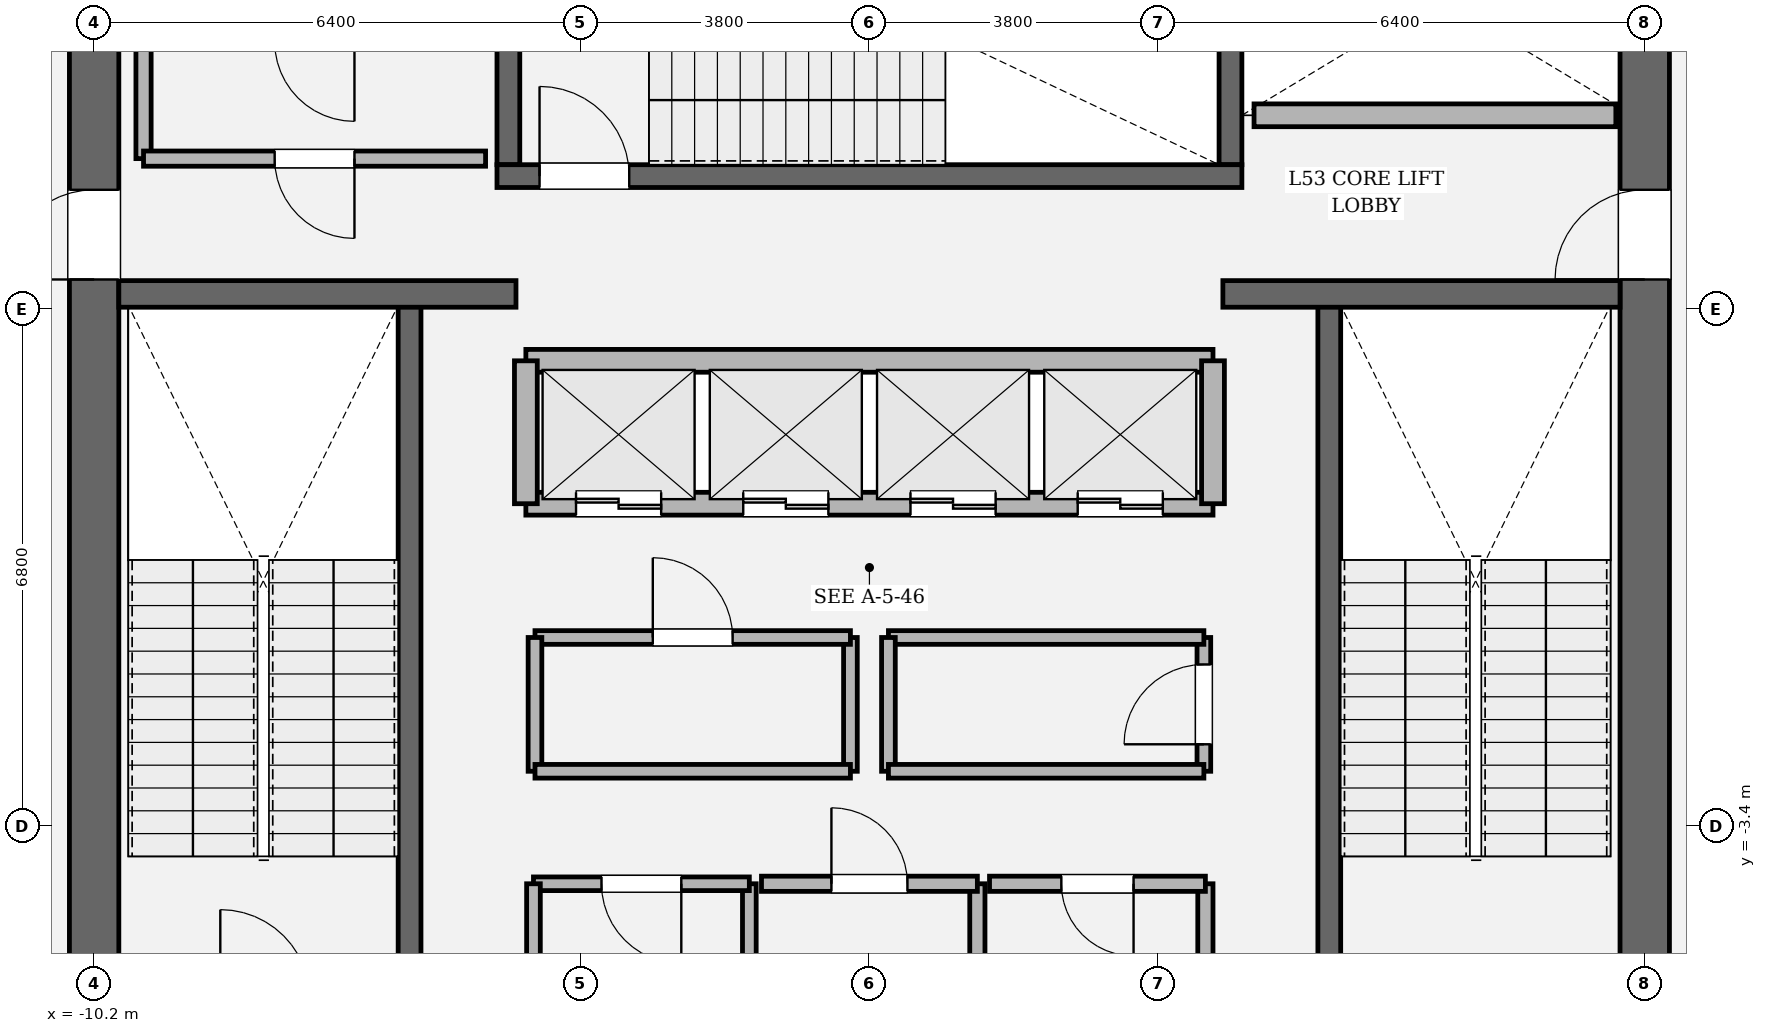
"""IFC4 building model, lengths in metres.
Left out: names, types, materials, properties, quantities, classifications, styles, units other than length and angle.
Written with IfcOpenShell. Run it as: python <this file> out.ifc"""

import sys

from ifc_helpers import new_model, si_unit, direction, frame, frame_2d, origin, place, context, subcontext, project, spatial, rectangle, extrude, element, fill, save


model = new_model("IFC4")
c1 = context("Model", 3, precision=1e-05, world=origin(), true_north=direction((0.0, 1.0)))
c2 = subcontext(c1, "Body", "Model", "MODEL_VIEW")
j1 = project(units=[si_unit("LENGTHUNIT", "METRE"), si_unit("PLANEANGLEUNIT", "RADIAN")], contexts=[c1])
p1 = place(None, origin())
s1 = spatial("IfcSite", under=j1, at=p1, CompositionType="ELEMENT")
p2 = place(p1, origin())
s2 = spatial("IfcBuilding", under=s1, at=p2, CompositionType="ELEMENT")
p3 = place(p2, frame((0.0, 0.0, 224.85)))
s3 = spatial("IfcBuildingStorey", under=s2, at=p3, CompositionType="ELEMENT", Elevation=224.85)
p4 = place(p3, frame((-10.2, -8.875, 0.0), z_axis=(0.0, 0.0, 1.0), x_axis=(0.0, 1.0, 0.0)))
e1 = element("IfcWall", 1, at=p4, inside=s3, PredefinedType="SHEAR", context=c2, shape_type="SweptSolid", body=[
    extrude(rectangle(XDim=17.75, YDim=0.65, at=frame_2d((8.875, 0.0))), origin(), (0.0, 0.0, 1.0), 4.05),
])
p5 = place(p4, frame((12.665, 0.0, 0.0)))
e2 = element("IfcOpeningElement", 2, at=p5, cuts=e1, PredefinedType="OPENING", context=c2, shape_type="SweptSolid", body=[
    extrude(rectangle(XDim=1.18, YDim=2.2, at=frame_2d((0.59, 1.1))), frame((0.0, 0.335, 0.0), z_axis=(0.0, -1.0, 0.0), x_axis=(1.0, 0.0, 0.0)), (0.0, 0.0, 1.0), 0.67),
])
p6 = place(p3, frame((10.2, 8.875, 0.0), z_axis=(0.0, 0.0, 1.0), x_axis=(0.0, -1.0, 0.0)))
e3 = element("IfcWall", 3, at=p6, inside=s3, PredefinedType="SHEAR", context=c2, shape_type="SweptSolid", body=[
    extrude(rectangle(XDim=17.75, YDim=0.65, at=frame_2d((8.875, 0.0))), origin(), (0.0, 0.0, 1.0), 4.05),
])
p7 = place(p6, frame((3.905, 0.0, 0.0)))
e4 = element("IfcOpeningElement", 4, at=p7, cuts=e3, PredefinedType="OPENING", context=c2, shape_type="SweptSolid", body=[
    extrude(rectangle(XDim=1.18, YDim=2.2, at=frame_2d((0.59, 1.1))), frame((0.0, 0.335, 0.0), z_axis=(0.0, -1.0, 0.0), x_axis=(1.0, 0.0, 0.0)), (0.0, 0.0, 1.0), 0.67),
])
for number, where, z_axis, x_axis in (
    (5, (-6.05, -5.5, 0.0), (0.0, 0.0, 1.0), (0.0, 1.0, 0.0)),
    (6, (6.05, 3.45, 0.0), (0.0, 0.0, 1.0), (0.0, -1.0, 0.0)),
):
    element("IfcWall", number, at=place(p3, frame(where, z_axis=z_axis, x_axis=x_axis)), inside=s3, PredefinedType="SOLIDWALL", context=c2, shape_type="SweptSolid", body=[
        extrude(rectangle(XDim=8.95, YDim=0.3, at=frame_2d((4.475, 0.0))), origin(), (0.0, 0.0, 1.0), 4.05),
    ])
for number, where, z_axis, x_axis in (
    (7, (-4.75, 5.3, 0.0), (0.0, 0.0, 1.0), (0.0, 1.0, 0.0)),
    (8, (4.75, 8.875, 0.0), (0.0, 0.0, 1.0), (0.0, -1.0, 0.0)),
):
    element("IfcWall", number, at=place(p3, frame(where, z_axis=z_axis, x_axis=x_axis)), inside=s3, PredefinedType="SOLIDWALL", context=c2, shape_type="SweptSolid", body=[
        extrude(rectangle(XDim=3.575, YDim=0.3, at=frame_2d((1.788, 0.0))), origin(), (0.0, 0.0, 1.0), 4.05),
    ])
p8 = place(p3, frame((-4.9, 5.15, 0.0), z_axis=(0.0, 0.0, 1.0), x_axis=(1.0, 0.0, 0.0)))
e9 = element("IfcWall", 9, at=p8, inside=s3, PredefinedType="SOLIDWALL", context=c2, shape_type="SweptSolid", body=[
    extrude(rectangle(XDim=9.8, YDim=0.3, at=frame_2d((4.9, 0.0))), origin(), (0.0, 0.0, 1.0), 4.05),
])
p9 = place(p8, frame((0.56, 0.0, 0.0)))
e10 = element("IfcOpeningElement", 10, at=p9, cuts=e9, PredefinedType="OPENING", context=c2, shape_type="SweptSolid", body=[
    extrude(rectangle(XDim=1.18, YDim=2.2, at=frame_2d((0.59, 1.1))), frame((0.0, 0.16, 0.0), z_axis=(0.0, -1.0, 0.0), x_axis=(1.0, 0.0, 0.0)), (0.0, 0.0, 1.0), 0.32),
])
for number, where, z_axis, x_axis in (
    (11, (-9.875, 3.6, 0.0), (0.0, 0.0, 1.0), (1.0, 0.0, 0.0)),
    (12, (4.65, 3.6, 0.0), (0.0, 0.0, 1.0), (1.0, 0.0, 0.0)),
):
    element("IfcWall", number, at=place(p3, frame(where, z_axis=z_axis, x_axis=x_axis)), inside=s3, PredefinedType="SOLIDWALL", context=c2, shape_type="SweptSolid", body=[
        extrude(rectangle(XDim=5.225, YDim=0.35, at=frame_2d((2.613, 0.0))), origin(), (0.0, 0.0, 1.0), 4.05),
    ])
p10 = place(p3, frame((-4.52, 0.84, 0.0), z_axis=(0.0, 0.0, 1.0), x_axis=(1.0, 0.0, 0.0)))
e13 = element("IfcWall", 13, at=p10, inside=s3, PredefinedType="SOLIDWALL", context=c2, shape_type="SweptSolid", body=[
    extrude(rectangle(XDim=9.04, YDim=0.3, at=frame_2d((4.52, 0.0))), origin(), (0.0, 0.0, 1.0), 3.83),
])
p11 = place(p10, frame((0.66, 0.0, 0.0)))
e14 = element("IfcOpeningElement", 14, at=p11, cuts=e13, PredefinedType="OPENING", context=c2, shape_type="SweptSolid", body=[
    extrude(rectangle(XDim=1.12, YDim=2.25, at=frame_2d((0.56, 1.125))), frame((0.0, 0.16, 0.0), z_axis=(0.0, -1.0, 0.0), x_axis=(1.0, 0.0, 0.0)), (0.0, 0.0, 1.0), 0.32),
])
p12 = place(p10, frame((2.86, 0.0, 0.0)))
e15 = element("IfcOpeningElement", 15, at=p12, cuts=e13, PredefinedType="OPENING", context=c2, shape_type="SweptSolid", body=[
    extrude(rectangle(XDim=1.12, YDim=2.25, at=frame_2d((0.56, 1.125))), frame((0.0, 0.16, 0.0), z_axis=(0.0, -1.0, 0.0), x_axis=(1.0, 0.0, 0.0)), (0.0, 0.0, 1.0), 0.32),
])
p13 = place(p10, frame((5.06, 0.0, 0.0)))
e16 = element("IfcOpeningElement", 16, at=p13, cuts=e13, PredefinedType="OPENING", context=c2, shape_type="SweptSolid", body=[
    extrude(rectangle(XDim=1.12, YDim=2.25, at=frame_2d((0.56, 1.125))), frame((0.0, 0.16, 0.0), z_axis=(0.0, -1.0, 0.0), x_axis=(1.0, 0.0, 0.0)), (0.0, 0.0, 1.0), 0.32),
])
p14 = place(p10, frame((7.26, 0.0, 0.0)))
e17 = element("IfcOpeningElement", 17, at=p14, cuts=e13, PredefinedType="OPENING", context=c2, shape_type="SweptSolid", body=[
    extrude(rectangle(XDim=1.12, YDim=2.25, at=frame_2d((0.56, 1.125))), frame((0.0, 0.16, 0.0), z_axis=(0.0, -1.0, 0.0), x_axis=(1.0, 0.0, 0.0)), (0.0, 0.0, 1.0), 0.32),
])
p15 = place(p3, frame((-4.52, 2.72, 0.0), z_axis=(0.0, 0.0, 1.0), x_axis=(1.0, 0.0, 0.0)))
e18 = element("IfcWall", 18, at=p15, inside=s3, PredefinedType="SOLIDWALL", context=c2, shape_type="SweptSolid", body=[
    extrude(rectangle(XDim=9.04, YDim=0.3, at=frame_2d((4.52, 0.0))), origin(), (0.0, 0.0, 1.0), 3.83),
])
for number, where, z_axis, x_axis in (
    (19, (-4.52, 0.84, 0.0), (0.0, 0.0, 1.0), (0.0, 1.0, 0.0)),
    (20, (4.52, 0.84, 0.0), (0.0, 0.0, 1.0), (0.0, 1.0, 0.0)),
):
    element("IfcWall", number, at=place(p3, frame(where, z_axis=z_axis, x_axis=x_axis)), inside=s3, PredefinedType="SOLIDWALL", context=c2, shape_type="SweptSolid", body=[
        extrude(rectangle(XDim=1.88, YDim=0.3, at=frame_2d((0.94, 0.0))), origin(), (0.0, 0.0, 1.0), 3.83),
    ])
p16 = place(p3, frame((5.06, 5.95, 0.0), z_axis=(0.0, 0.0, 1.0), x_axis=(1.0, 0.0, 0.0)))
e21 = element("IfcWall", 21, at=p16, inside=s3, PredefinedType="SOLIDWALL", context=c2, shape_type="SweptSolid", body=[
    extrude(rectangle(XDim=4.76, YDim=0.3, at=frame_2d((2.38, 0.0))), origin(), (0.0, 0.0, 1.0), 3.83),
])
p17 = place(p3, frame((-1.58, -5.9, 0.0), z_axis=(0.0, 0.0, 1.0), x_axis=(0.0, 1.0, 0.0)))
e22 = element("IfcWall", 22, at=p17, inside=s3, PredefinedType="PARTITIONING", context=c2, shape_type="SweptSolid", body=[
    extrude(rectangle(XDim=1.74, YDim=0.18, at=frame_2d((0.87, 0.0))), origin(), (0.0, 0.0, 1.0), 3.83),
])
p18 = place(p3, frame((-1.58, -4.16, 0.0), z_axis=(0.0, 0.0, 1.0), x_axis=(-1.0, 0.0, 0.0)))
e23 = element("IfcWall", 23, at=p18, inside=s3, PredefinedType="PARTITIONING", context=c2, shape_type="SweptSolid", body=[
    extrude(rectangle(XDim=2.84, YDim=0.18, at=frame_2d((1.42, 0.0))), origin(), (0.0, 0.0, 1.0), 3.83),
])
p19 = place(p18, frame((0.895, 0.0, 0.0)))
e24 = element("IfcOpeningElement", 24, at=p19, cuts=e23, PredefinedType="OPENING", context=c2, shape_type="SweptSolid", body=[
    extrude(rectangle(XDim=1.05, YDim=2.2, at=frame_2d((0.525, 1.1))), frame((0.0, 0.1, 0.0), z_axis=(0.0, -1.0, 0.0), x_axis=(1.0, 0.0, 0.0)), (0.0, 0.0, 1.0), 0.2),
])
p20 = place(p3, frame((-4.42, -4.16, 0.0), z_axis=(0.0, 0.0, 1.0), x_axis=(0.0, -1.0, 0.0)))
e25 = element("IfcWall", 25, at=p20, inside=s3, PredefinedType="PARTITIONING", context=c2, shape_type="SweptSolid", body=[
    extrude(rectangle(XDim=1.74, YDim=0.18, at=frame_2d((0.87, 0.0))), origin(), (0.0, 0.0, 1.0), 3.83),
])
p21 = place(p3, frame((1.42, -5.9, 0.0), z_axis=(0.0, 0.0, 1.0), x_axis=(0.0, 1.0, 0.0)))
e26 = element("IfcWall", 26, at=p21, inside=s3, PredefinedType="SOLIDWALL", context=c2, shape_type="SweptSolid", body=[
    extrude(rectangle(XDim=1.74, YDim=0.2, at=frame_2d((0.87, 0.0))), origin(), (0.0, 0.0, 1.0), 3.83),
])
p22 = place(p3, frame((1.42, -4.16, 0.0), z_axis=(0.0, 0.0, 1.0), x_axis=(-1.0, 0.0, 0.0)))
e27 = element("IfcWall", 27, at=p22, inside=s3, PredefinedType="SOLIDWALL", context=c2, shape_type="SweptSolid", body=[
    extrude(rectangle(XDim=2.84, YDim=0.2, at=frame_2d((1.42, 0.0))), origin(), (0.0, 0.0, 1.0), 3.83),
])
p23 = place(p22, frame((0.92, 0.0, 0.0)))
e28 = element("IfcOpeningElement", 28, at=p23, cuts=e27, PredefinedType="OPENING", context=c2, shape_type="SweptSolid", body=[
    extrude(rectangle(XDim=1.0, YDim=2.15, at=frame_2d((0.5, 1.075))), frame((0.0, 0.11, 0.0), z_axis=(0.0, -1.0, 0.0), x_axis=(1.0, 0.0, 0.0)), (0.0, 0.0, 1.0), 0.22),
])
p24 = place(p3, frame((4.42, -5.9, 0.0), z_axis=(0.0, 0.0, 1.0), x_axis=(0.0, 1.0, 0.0)))
e29 = element("IfcWall", 29, at=p24, inside=s3, PredefinedType="SOLIDWALL", context=c2, shape_type="SweptSolid", body=[
    extrude(rectangle(XDim=1.74, YDim=0.2, at=frame_2d((0.87, 0.0))), origin(), (0.0, 0.0, 1.0), 3.83),
])
p25 = place(p3, frame((4.42, -4.16, 0.0), z_axis=(0.0, 0.0, 1.0), x_axis=(-1.0, 0.0, 0.0)))
e30 = element("IfcWall", 30, at=p25, inside=s3, PredefinedType="SOLIDWALL", context=c2, shape_type="SweptSolid", body=[
    extrude(rectangle(XDim=2.84, YDim=0.2, at=frame_2d((1.42, 0.0))), origin(), (0.0, 0.0, 1.0), 3.83),
])
p26 = place(p25, frame((0.945, 0.0, 0.0)))
e31 = element("IfcOpeningElement", 31, at=p26, cuts=e30, PredefinedType="OPENING", context=c2, shape_type="SweptSolid", body=[
    extrude(rectangle(XDim=0.95, YDim=2.15, at=frame_2d((0.475, 1.075))), frame((0.0, 0.11, 0.0), z_axis=(0.0, -1.0, 0.0), x_axis=(1.0, 0.0, 0.0)), (0.0, 0.0, 1.0), 0.22),
])
p27 = place(p3, frame((-0.25, -2.68, 0.0), z_axis=(0.0, 0.0, 1.0), x_axis=(0.0, 1.0, 0.0)))
e32 = element("IfcWall", 32, at=p27, inside=s3, PredefinedType="PARTITIONING", context=c2, shape_type="SweptSolid", body=[
    extrude(rectangle(XDim=1.76, YDim=0.18, at=frame_2d((0.88, 0.0))), origin(), (0.0, 0.0, 1.0), 3.83),
])
p28 = place(p3, frame((-0.25, -0.92, 0.0), z_axis=(0.0, 0.0, 1.0), x_axis=(-1.0, 0.0, 0.0)))
e33 = element("IfcWall", 33, at=p28, inside=s3, PredefinedType="PARTITIONING", context=c2, shape_type="SweptSolid", body=[
    extrude(rectangle(XDim=4.15, YDim=0.18, at=frame_2d((2.075, 0.0))), origin(), (0.0, 0.0, 1.0), 3.83),
])
p29 = place(p28, frame((1.55, 0.0, 0.0)))
e34 = element("IfcOpeningElement", 34, at=p29, cuts=e33, PredefinedType="OPENING", context=c2, shape_type="SweptSolid", body=[
    extrude(rectangle(XDim=1.05, YDim=2.2, at=frame_2d((0.525, 1.1))), frame((0.0, 0.1, 0.0), z_axis=(0.0, -1.0, 0.0), x_axis=(1.0, 0.0, 0.0)), (0.0, 0.0, 1.0), 0.2),
])
p30 = place(p3, frame((-4.4, -0.92, 0.0), z_axis=(0.0, 0.0, 1.0), x_axis=(0.0, -1.0, 0.0)))
e35 = element("IfcWall", 35, at=p30, inside=s3, PredefinedType="PARTITIONING", context=c2, shape_type="SweptSolid", body=[
    extrude(rectangle(XDim=1.76, YDim=0.18, at=frame_2d((0.88, 0.0))), origin(), (0.0, 0.0, 1.0), 3.83),
])
p31 = place(p3, frame((-4.4, -2.68, 0.0), z_axis=(0.0, 0.0, 1.0), x_axis=(1.0, 0.0, 0.0)))
e36 = element("IfcWall", 36, at=p31, inside=s3, PredefinedType="PARTITIONING", context=c2, shape_type="SweptSolid", body=[
    extrude(rectangle(XDim=4.15, YDim=0.18, at=frame_2d((2.075, 0.0))), origin(), (0.0, 0.0, 1.0), 3.83),
])
p32 = place(p3, frame((4.4, -2.68, 0.0), z_axis=(0.0, 0.0, 1.0), x_axis=(0.0, 1.0, 0.0)))
e37 = element("IfcWall", 37, at=p32, inside=s3, PredefinedType="PARTITIONING", context=c2, shape_type="SweptSolid", body=[
    extrude(rectangle(XDim=1.76, YDim=0.18, at=frame_2d((0.88, 0.0))), origin(), (0.0, 0.0, 1.0), 3.83),
])
p33 = place(p32, frame((0.355, 0.0, 0.0)))
e38 = element("IfcOpeningElement", 38, at=p33, cuts=e37, PredefinedType="OPENING", context=c2, shape_type="SweptSolid", body=[
    extrude(rectangle(XDim=1.05, YDim=2.2, at=frame_2d((0.525, 1.1))), frame((0.0, 0.1, 0.0), z_axis=(0.0, -1.0, 0.0), x_axis=(1.0, 0.0, 0.0)), (0.0, 0.0, 1.0), 0.2),
])
p34 = place(p3, frame((4.4, -0.92, 0.0), z_axis=(0.0, 0.0, 1.0), x_axis=(-1.0, 0.0, 0.0)))
e39 = element("IfcWall", 39, at=p34, inside=s3, PredefinedType="PARTITIONING", context=c2, shape_type="SweptSolid", body=[
    extrude(rectangle(XDim=4.15, YDim=0.18, at=frame_2d((2.075, 0.0))), origin(), (0.0, 0.0, 1.0), 3.83),
])
p35 = place(p3, frame((0.25, -0.92, 0.0), z_axis=(0.0, 0.0, 1.0), x_axis=(0.0, -1.0, 0.0)))
e40 = element("IfcWall", 40, at=p35, inside=s3, PredefinedType="PARTITIONING", context=c2, shape_type="SweptSolid", body=[
    extrude(rectangle(XDim=1.76, YDim=0.18, at=frame_2d((0.88, 0.0))), origin(), (0.0, 0.0, 1.0), 3.83),
])
p36 = place(p3, frame((0.25, -2.68, 0.0), z_axis=(0.0, 0.0, 1.0), x_axis=(1.0, 0.0, 0.0)))
e41 = element("IfcWall", 41, at=p36, inside=s3, PredefinedType="PARTITIONING", context=c2, shape_type="SweptSolid", body=[
    extrude(rectangle(XDim=4.15, YDim=0.18, at=frame_2d((2.075, 0.0))), origin(), (0.0, 0.0, 1.0), 3.83),
])
p37 = place(p3, frame((-9.55, 6.92, 0.0), z_axis=(0.0, 0.0, 1.0), x_axis=(0.0, -1.0, 0.0)))
e42 = element("IfcWall", 42, at=p37, inside=s3, PredefinedType="SOLIDWALL", context=c2, shape_type="SweptSolid", body=[
    extrude(rectangle(XDim=1.54, YDim=0.2, at=frame_2d((0.77, 0.0))), origin(), (0.0, 0.0, 1.0), 3.83),
])
p38 = place(p3, frame((-9.55, 5.38, 0.0), z_axis=(0.0, 0.0, 1.0), x_axis=(1.0, 0.0, 0.0)))
e43 = element("IfcWall", 43, at=p38, inside=s3, PredefinedType="SOLIDWALL", context=c2, shape_type="SweptSolid", body=[
    extrude(rectangle(XDim=4.5, YDim=0.2, at=frame_2d((2.25, 0.0))), origin(), (0.0, 0.0, 1.0), 3.83),
])
p39 = place(p38, frame((1.725, 0.0, 0.0)))
e44 = element("IfcOpeningElement", 44, at=p39, cuts=e43, PredefinedType="OPENING", context=c2, shape_type="SweptSolid", body=[
    extrude(rectangle(XDim=1.05, YDim=2.2, at=frame_2d((0.525, 1.1))), frame((0.0, 0.11, 0.0), z_axis=(0.0, -1.0, 0.0), x_axis=(1.0, 0.0, 0.0)), (0.0, 0.0, 1.0), 0.22),
])
p40 = place(p9, origin())
e45 = element("IfcDoor", 45, at=p40, inside=s3, OperationType="SINGLE_SWING_LEFT", PredefinedType="DOOR", context=c2, shape_type="SweptSolid", body=[
    extrude(rectangle(XDim=1.18, YDim=2.2, at=frame_2d((0.59, 1.1))), frame((0.0, 0.025, 0.0), z_axis=(0.0, -1.0, 0.0), x_axis=(1.0, 0.0, 0.0)), (0.0, 0.0, 1.0), 0.05),
])
fill(e10, e45)
p41 = place(p5, origin())
e46 = element("IfcDoor", 46, at=p41, inside=s3, OperationType="SINGLE_SWING_LEFT", PredefinedType="DOOR", context=c2, shape_type="SweptSolid", body=[
    extrude(rectangle(XDim=1.18, YDim=2.2, at=frame_2d((0.59, 1.1))), frame((0.0, 0.025, 0.0), z_axis=(0.0, -1.0, 0.0), x_axis=(1.0, 0.0, 0.0)), (0.0, 0.0, 1.0), 0.05),
])
fill(e2, e46)
p42 = place(p7, origin())
e47 = element("IfcDoor", 47, at=p42, inside=s3, OperationType="SINGLE_SWING_RIGHT", PredefinedType="DOOR", context=c2, shape_type="SweptSolid", body=[
    extrude(rectangle(XDim=1.18, YDim=2.2, at=frame_2d((0.59, 1.1))), frame((0.0, 0.025, 0.0), z_axis=(0.0, -1.0, 0.0), x_axis=(1.0, 0.0, 0.0)), (0.0, 0.0, 1.0), 0.05),
])
fill(e4, e47)
p43 = place(p11, origin())
e48 = element("IfcDoor", 48, at=p43, inside=s3, OperationType="DOUBLE_DOOR_SLIDING", PredefinedType="DOOR", context=c2, shape_type="SweptSolid", body=[
    extrude(rectangle(XDim=1.12, YDim=2.25, at=frame_2d((0.56, 1.125))), frame((0.0, 0.025, 0.0), z_axis=(0.0, -1.0, 0.0), x_axis=(1.0, 0.0, 0.0)), (0.0, 0.0, 1.0), 0.05),
])
fill(e14, e48)
p44 = place(p12, origin())
e49 = element("IfcDoor", 49, at=p44, inside=s3, OperationType="DOUBLE_DOOR_SLIDING", PredefinedType="DOOR", context=c2, shape_type="SweptSolid", body=[
    extrude(rectangle(XDim=1.12, YDim=2.25, at=frame_2d((0.56, 1.125))), frame((0.0, 0.025, 0.0), z_axis=(0.0, -1.0, 0.0), x_axis=(1.0, 0.0, 0.0)), (0.0, 0.0, 1.0), 0.05),
])
fill(e15, e49)
p45 = place(p13, origin())
e50 = element("IfcDoor", 50, at=p45, inside=s3, OperationType="DOUBLE_DOOR_SLIDING", PredefinedType="DOOR", context=c2, shape_type="SweptSolid", body=[
    extrude(rectangle(XDim=1.12, YDim=2.25, at=frame_2d((0.56, 1.125))), frame((0.0, 0.025, 0.0), z_axis=(0.0, -1.0, 0.0), x_axis=(1.0, 0.0, 0.0)), (0.0, 0.0, 1.0), 0.05),
])
fill(e16, e50)
p46 = place(p14, origin())
e51 = element("IfcDoor", 51, at=p46, inside=s3, OperationType="DOUBLE_DOOR_SLIDING", PredefinedType="DOOR", context=c2, shape_type="SweptSolid", body=[
    extrude(rectangle(XDim=1.12, YDim=2.25, at=frame_2d((0.56, 1.125))), frame((0.0, 0.025, 0.0), z_axis=(0.0, -1.0, 0.0), x_axis=(1.0, 0.0, 0.0)), (0.0, 0.0, 1.0), 0.05),
])
fill(e17, e51)
p47 = place(p19, origin())
e52 = element("IfcDoor", 52, at=p47, inside=s3, OperationType="SINGLE_SWING_LEFT", PredefinedType="DOOR", context=c2, shape_type="SweptSolid", body=[
    extrude(rectangle(XDim=1.05, YDim=2.2, at=frame_2d((0.525, 1.1))), frame((0.0, 0.025, 0.0), z_axis=(0.0, -1.0, 0.0), x_axis=(1.0, 0.0, 0.0)), (0.0, 0.0, 1.0), 0.05),
])
fill(e24, e52)
p48 = place(p23, origin())
e53 = element("IfcDoor", 53, at=p48, inside=s3, OperationType="SINGLE_SWING_RIGHT", PredefinedType="DOOR", context=c2, shape_type="SweptSolid", body=[
    extrude(rectangle(XDim=1.0, YDim=2.15, at=frame_2d((0.5, 1.075))), frame((0.0, 0.025, 0.0), z_axis=(0.0, -1.0, 0.0), x_axis=(1.0, 0.0, 0.0)), (0.0, 0.0, 1.0), 0.05),
])
fill(e28, e53)
p49 = place(p26, origin())
e54 = element("IfcDoor", 54, at=p49, inside=s3, OperationType="SINGLE_SWING_LEFT", PredefinedType="DOOR", context=c2, shape_type="SweptSolid", body=[
    extrude(rectangle(XDim=0.95, YDim=2.15, at=frame_2d((0.475, 1.075))), frame((0.0, 0.025, 0.0), z_axis=(0.0, -1.0, 0.0), x_axis=(1.0, 0.0, 0.0)), (0.0, 0.0, 1.0), 0.05),
])
fill(e31, e54)
p50 = place(p29, origin())
e55 = element("IfcDoor", 55, at=p50, inside=s3, OperationType="SINGLE_SWING_RIGHT", PredefinedType="DOOR", context=c2, shape_type="SweptSolid", body=[
    extrude(rectangle(XDim=1.05, YDim=2.2, at=frame_2d((0.525, 1.1))), frame((0.0, 0.025, 0.0), z_axis=(0.0, -1.0, 0.0), x_axis=(1.0, 0.0, 0.0)), (0.0, 0.0, 1.0), 0.05),
])
fill(e34, e55)
p51 = place(p33, origin())
e56 = element("IfcDoor", 56, at=p51, inside=s3, OperationType="SINGLE_SWING_LEFT", PredefinedType="DOOR", context=c2, shape_type="SweptSolid", body=[
    extrude(rectangle(XDim=1.05, YDim=2.2, at=frame_2d((0.525, 1.1))), frame((0.0, 0.025, 0.0), z_axis=(0.0, -1.0, 0.0), x_axis=(1.0, 0.0, 0.0)), (0.0, 0.0, 1.0), 0.05),
])
fill(e38, e56)
p52 = place(p39, origin())
e57 = element("IfcDoor", 57, at=p52, inside=s3, OperationType="SINGLE_SWING_RIGHT", PredefinedType="DOOR", context=c2, shape_type="SweptSolid", body=[
    extrude(rectangle(XDim=1.05, YDim=2.2, at=frame_2d((0.525, 1.1))), frame((0.0, 0.025, 0.0), z_axis=(0.0, -1.0, 0.0), x_axis=(1.0, 0.0, 0.0)), (0.0, 0.0, 1.0), 0.05),
])
fill(e44, e57)
save(model, sys.argv[1])
